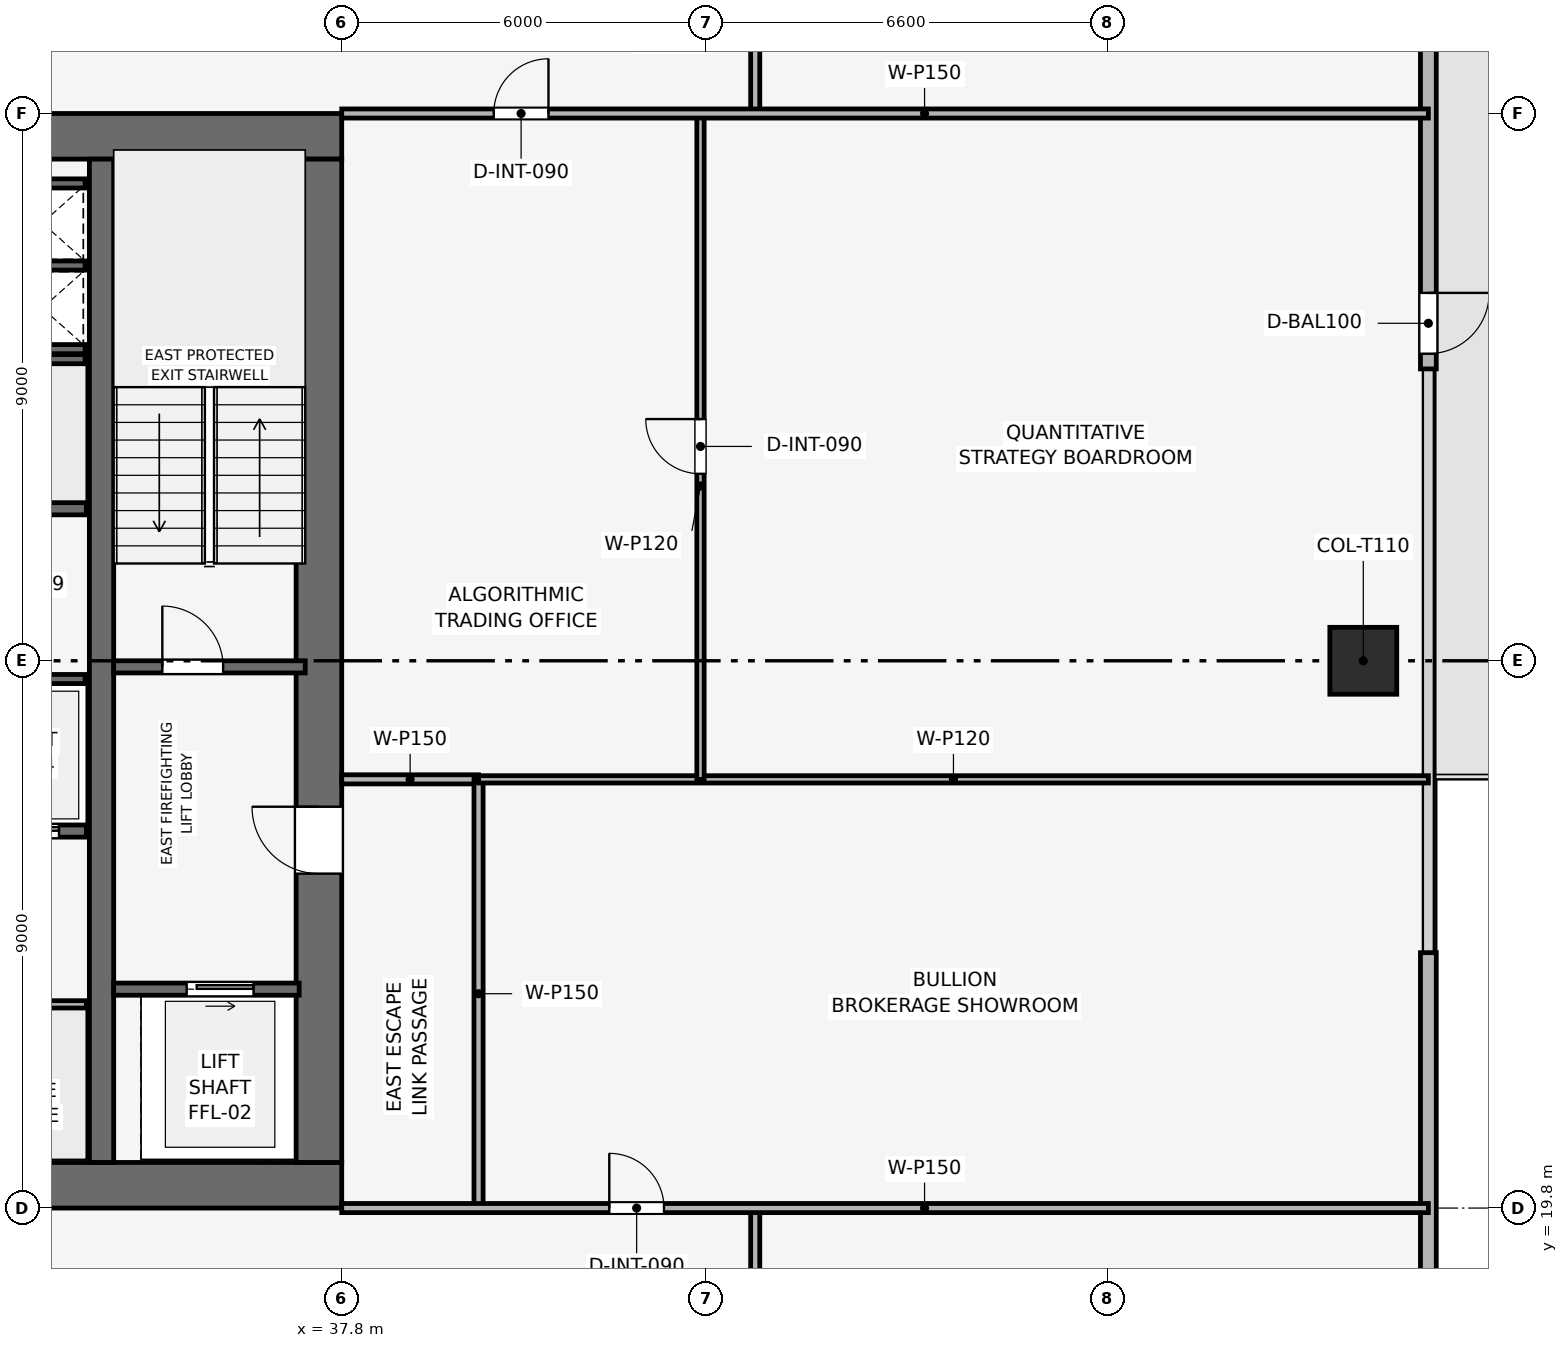
"""IFC4 building model, lengths in metres.
Left out: names, types, materials, properties, quantities, classifications, styles, units other than length and angle.
Written with IfcOpenShell. Run it as: python <this file> out.ifc"""

import sys

from ifc_helpers import new_model, si_unit, direction, frame, frame_2d, origin, origin_2d, place, context, subcontext, project, spatial, rectangle, extrude, element, fill, save


model = new_model("IFC4")
c1 = context("Model", 3, precision=1e-05, world=origin(), true_north=direction((0.0, 1.0)))
c2 = subcontext(c1, "Body", "Model", "MODEL_VIEW")
j1 = project(units=[si_unit("LENGTHUNIT", "METRE"), si_unit("PLANEANGLEUNIT", "RADIAN")], contexts=[c1])
p1 = place(None, origin())
s1 = spatial("IfcSite", under=j1, at=p1, CompositionType="ELEMENT")
p2 = place(p1, origin())
s2 = spatial("IfcBuilding", under=s1, at=p2, CompositionType="ELEMENT")
p3 = place(p2, frame((0.0, 0.0, 199.95)))
s3 = spatial("IfcBuildingStorey", under=s2, at=p3, CompositionType="ELEMENT", Elevation=199.95)
p4 = place(p3, frame((19.8, 20.175, 0.0), z_axis=(0.0, 0.0, 1.0), x_axis=(1.0, 0.0, 0.0)))
e1 = element("IfcWall", 1, at=p4, inside=s3, PredefinedType="SHEAR", context=c2, shape_type="SweptSolid", body=[
    extrude(rectangle(XDim=18.0, YDim=0.75, at=frame_2d((9.0, 0.0))), origin(), (0.0, 0.0, 1.0), 3.75),
])
p5 = place(p4, frame((8.4, 0.0, 0.0)))
e2 = element("IfcOpeningElement", 2, at=p5, cuts=e1, PredefinedType="OPENING", context=c2, shape_type="SweptSolid", body=[
    extrude(rectangle(XDim=1.2, YDim=2.2, at=frame_2d((0.6, 1.1))), frame((0.0, 0.385, 0.0), z_axis=(0.0, -1.0, 0.0), x_axis=(1.0, 0.0, 0.0)), (0.0, 0.0, 1.0), 0.77),
])
p6 = place(p3, frame((19.8, 37.425, 0.0), z_axis=(0.0, 0.0, 1.0), x_axis=(1.0, 0.0, 0.0)))
e3 = element("IfcWall", 3, at=p6, inside=s3, PredefinedType="SHEAR", context=c2, shape_type="SweptSolid", body=[
    extrude(rectangle(XDim=18.0, YDim=0.75, at=frame_2d((9.0, 0.0))), origin(), (0.0, 0.0, 1.0), 3.75),
])
p7 = place(p6, frame((7.05, 0.0, 0.0)))
e4 = element("IfcOpeningElement", 4, at=p7, cuts=e3, PredefinedType="OPENING", context=c2, shape_type="SweptSolid", body=[
    extrude(rectangle(XDim=1.1, YDim=2.15, at=frame_2d((0.55, 1.075))), frame((0.0, 0.385, 0.0), z_axis=(0.0, -1.0, 0.0), x_axis=(1.0, 0.0, 0.0)), (0.0, 0.0, 1.0), 0.77),
])
p8 = place(p3, frame((37.425, 20.55, 0.0), z_axis=(0.0, 0.0, 1.0), x_axis=(0.0, 1.0, 0.0)))
e5 = element("IfcWall", 5, at=p8, inside=s3, PredefinedType="SHEAR", context=c2, shape_type="SweptSolid", body=[
    extrude(rectangle(XDim=16.5, YDim=0.75, at=frame_2d((8.25, 0.0))), origin(), (0.0, 0.0, 1.0), 3.75),
])
p9 = place(p8, frame((4.75, 0.0, 0.0)))
e6 = element("IfcOpeningElement", 6, at=p9, cuts=e5, PredefinedType="OPENING", context=c2, shape_type="SweptSolid", body=[
    extrude(rectangle(XDim=1.1, YDim=2.15, at=frame_2d((0.55, 1.075))), frame((0.0, 0.385, 0.0), z_axis=(0.0, -1.0, 0.0), x_axis=(1.0, 0.0, 0.0)), (0.0, 0.0, 1.0), 0.77),
])
p10 = place(p3, frame((33.85, 20.55, 0.0), z_axis=(0.0, 0.0, 1.0), x_axis=(0.0, 1.0, 0.0)))
e7 = element("IfcWall", 7, at=p10, inside=s3, PredefinedType="SHEAR", context=c2, shape_type="SweptSolid", body=[
    extrude(rectangle(XDim=16.5, YDim=0.4, at=frame_2d((8.25, 0.0))), origin(), (0.0, 0.0, 1.0), 3.75),
])
p11 = place(p3, frame((54.6, 28.8, 0.003), z_axis=(0.0, 0.0, 1.0), x_axis=(1.0, 0.0, 0.0)))
e8 = element("IfcColumn", 8, at=p11, inside=s3, PredefinedType="COLUMN", context=c2, shape_type="SweptSolid", body=[
    extrude(rectangle(XDim=1.1, YDim=1.1, at=origin_2d()), origin(), (0.0, 0.0, 1.0), 3.494),
])
p12 = place(p3, frame((55.67, 48.3, 0.0), z_axis=(0.0, 0.0, 1.0), x_axis=(0.0, -1.0, 0.0)))
e9 = element("IfcWall", 9, at=p12, inside=s3, PredefinedType="SOLIDWALL", context=c2, shape_type="SweptSolid", body=[
    extrude(rectangle(XDim=14.7, YDim=0.26, at=frame_2d((7.35, 0.0))), origin(), (0.0, 0.0, 1.0), 3.5),
])
p13 = place(p12, frame((13.45, 0.0, 0.0)))
e10 = element("IfcOpeningElement", 10, at=p13, cuts=e9, PredefinedType="OPENING", context=c2, shape_type="SweptSolid", body=[
    extrude(rectangle(XDim=1.0, YDim=2.2, at=frame_2d((0.5, 1.1))), frame((0.0, 0.14, 0.0), z_axis=(0.0, -1.0, 0.0), x_axis=(1.0, 0.0, 0.0)), (0.0, 0.0, 1.0), 0.28),
])
p14 = place(p3, frame((55.67, 24.0, 0.0), z_axis=(0.0, 0.0, 1.0), x_axis=(0.0, -1.0, 0.0)))
e11 = element("IfcWall", 11, at=p14, inside=s3, PredefinedType="SOLIDWALL", context=c2, shape_type="SweptSolid", body=[
    extrude(rectangle(XDim=14.7, YDim=0.26, at=frame_2d((7.35, 0.0))), origin(), (0.0, 0.0, 1.0), 3.5),
])
p15 = place(p14, frame((10.65, 0.0, 0.9)))
e12 = element("IfcOpeningElement", 12, at=p15, cuts=e11, PredefinedType="OPENING", context=c2, shape_type="SweptSolid", body=[
    extrude(rectangle(XDim=3.8, YDim=1.9, at=frame_2d((1.9, 0.95))), frame((0.0, 0.14, 0.0), z_axis=(0.0, -1.0, 0.0), x_axis=(1.0, 0.0, 0.0)), (0.0, 0.0, 1.0), 0.28),
])
p16 = place(p3, frame((34.05, 28.7, 0.0), z_axis=(0.0, 0.0, 1.0), x_axis=(1.0, 0.0, 0.0)))
e13 = element("IfcWall", 13, at=p16, inside=s3, PredefinedType="SHEAR", context=c2, shape_type="SweptSolid", body=[
    extrude(rectangle(XDim=3.15, YDim=0.2, at=frame_2d((1.575, 0.0))), origin(), (0.0, 0.0, 1.0), 3.5),
])
p17 = place(p16, frame((0.8, 0.0, 0.0)))
e14 = element("IfcOpeningElement", 14, at=p17, cuts=e13, PredefinedType="OPENING", context=c2, shape_type="SweptSolid", body=[
    extrude(rectangle(XDim=1.0, YDim=2.1, at=frame_2d((0.5, 1.05))), frame((0.0, 0.11, 0.0), z_axis=(0.0, -1.0, 0.0), x_axis=(1.0, 0.0, 0.0)), (0.0, 0.0, 1.0), 0.22),
])
for number, where, z_axis, x_axis in (
    (15, (32.25, 33.925, 0.0), (0.0, 0.0, 1.0), (1.0, 0.0, 0.0)),
    (16, (32.25, 35.3, 0.0), (0.0, 0.0, 1.0), (1.0, 0.0, 0.0)),
):
    element("IfcWall", number, at=place(p3, frame(where, z_axis=z_axis, x_axis=x_axis)), inside=s3, PredefinedType="SHEAR", context=c2, shape_type="SweptSolid", body=[
        extrude(rectangle(XDim=1.33, YDim=0.15, at=frame_2d((0.665, 0.0))), origin(), (0.0, 0.0, 1.0), 3.5),
    ])
p18 = place(p3, frame((34.05, 23.4, 0.0), z_axis=(0.0, 0.0, 1.0), x_axis=(1.0, 0.0, 0.0)))
e17 = element("IfcWall", 17, at=p18, inside=s3, PredefinedType="SHEAR", context=c2, shape_type="SweptSolid", body=[
    extrude(rectangle(XDim=3.05, YDim=0.2, at=frame_2d((1.525, 0.0))), origin(), (0.0, 0.0, 1.0), 3.5),
])
p19 = place(p18, frame((1.2, 0.0, 0.0)))
e18 = element("IfcOpeningElement", 18, at=p19, cuts=e17, PredefinedType="OPENING", context=c2, shape_type="SweptSolid", body=[
    extrude(rectangle(XDim=1.1, YDim=2.15, at=frame_2d((0.55, 1.075))), frame((0.0, 0.11, 0.0), z_axis=(0.0, -1.0, 0.0), x_axis=(1.0, 0.0, 0.0)), (0.0, 0.0, 1.0), 0.22),
])
p20 = place(p3, frame((31.6, 26.0, 0.0), z_axis=(0.0, 0.0, 1.0), x_axis=(1.0, 0.0, 0.0)))
e19 = element("IfcWall", 19, at=p20, inside=s3, PredefinedType="SHEAR", context=c2, shape_type="SweptSolid", body=[
    extrude(rectangle(XDim=2.0, YDim=0.2, at=frame_2d((1.0, 0.0))), origin(), (0.0, 0.0, 1.0), 3.5),
])
p21 = place(p20, frame((0.45, 0.0, 0.0)))
e20 = element("IfcOpeningElement", 20, at=p21, cuts=e19, PredefinedType="OPENING", context=c2, shape_type="SweptSolid", body=[
    extrude(rectangle(XDim=1.1, YDim=2.15, at=frame_2d((0.55, 1.075))), frame((0.0, 0.11, 0.0), z_axis=(0.0, -1.0, 0.0), x_axis=(1.0, 0.0, 0.0)), (0.0, 0.0, 1.0), 0.22),
])
p22 = place(p3, frame((31.6, 31.3, 0.0), z_axis=(0.0, 0.0, 1.0), x_axis=(1.0, 0.0, 0.0)))
e21 = element("IfcWall", 21, at=p22, inside=s3, PredefinedType="SHEAR", context=c2, shape_type="SweptSolid", body=[
    extrude(rectangle(XDim=2.0, YDim=0.2, at=frame_2d((1.0, 0.0))), origin(), (0.0, 0.0, 1.0), 3.5),
])
p23 = place(p3, frame((32.25, 36.65, 0.0), z_axis=(0.0, 0.0, 1.0), x_axis=(1.0, 0.0, 0.0)))
e22 = element("IfcWall", 22, at=p23, inside=s3, PredefinedType="SHEAR", context=c2, shape_type="SweptSolid", body=[
    extrude(rectangle(XDim=1.33, YDim=0.15, at=frame_2d((0.665, 0.0))), origin(), (0.0, 0.0, 1.0), 3.5),
])
for number, where, z_axis, x_axis in (
    (23, (29.5, 28.5, 0.0), (0.0, 0.0, 1.0), (1.0, 0.0, 0.0)),
    (24, (29.5, 33.76, 0.0), (0.0, 0.0, 1.0), (1.0, 0.0, 0.0)),
):
    element("IfcWall", number, at=place(p3, frame(where, z_axis=z_axis, x_axis=x_axis)), inside=s3, PredefinedType="SHEAR", context=c2, shape_type="SweptSolid", body=[
        extrude(rectangle(XDim=4.08, YDim=0.15, at=frame_2d((2.04, 0.0))), origin(), (0.0, 0.0, 1.0), 3.5),
    ])
p24 = place(p3, frame((29.55, 23.15, 0.0), z_axis=(0.0, 0.0, 1.0), x_axis=(1.0, 0.0, 0.0)))
e25 = element("IfcWall", 25, at=p24, inside=s3, PredefinedType="PARTITIONING", context=c2, shape_type="SweptSolid", body=[
    extrude(rectangle(XDim=4.05, YDim=0.12, at=frame_2d((2.025, 0.0))), origin(), (0.0, 0.0, 1.0), 3.5),
])
p25 = place(p24, frame((1.575, 0.0, 0.0)))
e26 = element("IfcOpeningElement", 26, at=p25, cuts=e25, PredefinedType="OPENING", context=c2, shape_type="SweptSolid", body=[
    extrude(rectangle(XDim=0.9, YDim=2.1, at=frame_2d((0.45, 1.05))), frame((0.0, 0.07, 0.0), z_axis=(0.0, -1.0, 0.0), x_axis=(1.0, 0.0, 0.0)), (0.0, 0.0, 1.0), 0.14),
])
p26 = place(p3, frame((37.8, 26.85, 0.0), z_axis=(0.0, 0.0, 1.0), x_axis=(1.0, 0.0, 0.0)))
e27 = element("IfcWall", 27, at=p26, inside=s3, PredefinedType="PARTITIONING", context=c2, shape_type="SweptSolid", body=[
    extrude(rectangle(XDim=2.25, YDim=0.15, at=frame_2d((1.125, 0.0))), origin(), (0.0, 0.0, 1.0), 3.5),
])
p27 = place(p3, frame((40.05, 19.8, 0.0), z_axis=(0.0, 0.0, 1.0), x_axis=(0.0, 1.0, 0.0)))
e28 = element("IfcWall", 28, at=p27, inside=s3, PredefinedType="PARTITIONING", context=c2, shape_type="SweptSolid", body=[
    extrude(rectangle(XDim=7.05, YDim=0.15, at=frame_2d((3.525, 0.0))), origin(), (0.0, 0.0, 1.0), 3.035),
])
p28 = place(p3, frame((40.05, 26.85, 0.0), z_axis=(0.0, 0.0, 1.0), x_axis=(1.0, 0.0, 0.0)))
e29 = element("IfcWall", 29, at=p28, inside=s3, PredefinedType="PARTITIONING", context=c2, shape_type="SweptSolid", body=[
    extrude(rectangle(XDim=15.62, YDim=0.12, at=frame_2d((7.81, 0.0))), origin(), (0.0, 0.0, 1.0), 2.885),
])
p29 = place(p3, frame((43.7, 26.85, 0.0), z_axis=(0.0, 0.0, 1.0), x_axis=(0.0, 1.0, 0.0)))
e30 = element("IfcWall", 30, at=p29, inside=s3, PredefinedType="PARTITIONING", context=c2, shape_type="SweptSolid", body=[
    extrude(rectangle(XDim=10.95, YDim=0.12, at=frame_2d((5.475, 0.0))), origin(), (0.0, 0.0, 1.0), 3.035),
])
p30 = place(p29, frame((5.025, 0.0, 0.0)))
e31 = element("IfcOpeningElement", 31, at=p30, cuts=e30, PredefinedType="OPENING", context=c2, shape_type="SweptSolid", body=[
    extrude(rectangle(XDim=0.9, YDim=2.1, at=frame_2d((0.45, 1.05))), frame((0.0, 0.07, 0.0), z_axis=(0.0, -1.0, 0.0), x_axis=(1.0, 0.0, 0.0)), (0.0, 0.0, 1.0), 0.14),
])
p31 = place(p3, frame((44.6, 17.4, 0.0), z_axis=(0.0, 0.0, 1.0), x_axis=(0.0, 1.0, 0.0)))
e32 = element("IfcWall", 32, at=p31, inside=s3, PredefinedType="PARTITIONING", context=c2, shape_type="SweptSolid", body=[
    extrude(rectangle(XDim=2.4, YDim=0.15, at=frame_2d((1.2, 0.0))), origin(), (0.0, 0.0, 1.0), 3.5),
])
p32 = place(p3, frame((44.6, 37.8, 0.0), z_axis=(0.0, 0.0, 1.0), x_axis=(0.0, 1.0, 0.0)))
e33 = element("IfcWall", 33, at=p32, inside=s3, PredefinedType="PARTITIONING", context=c2, shape_type="SweptSolid", body=[
    extrude(rectangle(XDim=2.4, YDim=0.15, at=frame_2d((1.2, 0.0))), origin(), (0.0, 0.0, 1.0), 3.5),
])
p33 = place(p3, frame((37.8, 19.8, 0.0), z_axis=(0.0, 0.0, 1.0), x_axis=(1.0, 0.0, 0.0)))
e34 = element("IfcWall", 34, at=p33, inside=s3, PredefinedType="PARTITIONING", context=c2, shape_type="SweptSolid", body=[
    extrude(rectangle(XDim=17.87, YDim=0.15, at=frame_2d((8.935, 0.0))), origin(), (0.0, 0.0, 1.0), 2.885),
])
p34 = place(p33, frame((4.4, 0.0, 0.0)))
e35 = element("IfcOpeningElement", 35, at=p34, cuts=e34, PredefinedType="OPENING", context=c2, shape_type="SweptSolid", body=[
    extrude(rectangle(XDim=0.9, YDim=2.1, at=frame_2d((0.45, 1.05))), frame((0.0, 0.085, 0.0), z_axis=(0.0, -1.0, 0.0), x_axis=(1.0, 0.0, 0.0)), (0.0, 0.0, 1.0), 0.17),
])
p35 = place(p3, frame((37.8, 37.8, 0.0), z_axis=(0.0, 0.0, 1.0), x_axis=(1.0, 0.0, 0.0)))
e36 = element("IfcWall", 36, at=p35, inside=s3, PredefinedType="PARTITIONING", context=c2, shape_type="SweptSolid", body=[
    extrude(rectangle(XDim=17.87, YDim=0.15, at=frame_2d((8.935, 0.0))), origin(), (0.0, 0.0, 1.0), 2.885),
])
p36 = place(p35, frame((2.5, 0.0, 0.0)))
e37 = element("IfcOpeningElement", 37, at=p36, cuts=e36, PredefinedType="OPENING", context=c2, shape_type="SweptSolid", body=[
    extrude(rectangle(XDim=0.9, YDim=2.1, at=frame_2d((0.45, 1.05))), frame((0.0, 0.085, 0.0), z_axis=(0.0, -1.0, 0.0), x_axis=(1.0, 0.0, 0.0)), (0.0, 0.0, 1.0), 0.17),
])
p37 = place(p13, origin())
e38 = element("IfcDoor", 38, at=p37, inside=s3, OperationType="SINGLE_SWING_LEFT", PredefinedType="DOOR", context=c2, shape_type="SweptSolid", body=[
    extrude(rectangle(XDim=1.0, YDim=2.2, at=frame_2d((0.5, 1.1))), frame((0.0, 0.025, 0.0), z_axis=(0.0, -1.0, 0.0), x_axis=(1.0, 0.0, 0.0)), (0.0, 0.0, 1.0), 0.05),
])
fill(e10, e38)
p38 = place(p17, origin())
e39 = element("IfcDoor", 39, at=p38, inside=s3, OperationType="SINGLE_SWING_LEFT", PredefinedType="DOOR", context=c2, shape_type="SweptSolid", body=[
    extrude(rectangle(XDim=1.0, YDim=2.1, at=frame_2d((0.5, 1.05))), frame((0.0, 0.025, 0.0), z_axis=(0.0, -1.0, 0.0), x_axis=(1.0, 0.0, 0.0)), (0.0, 0.0, 1.0), 0.05),
])
fill(e14, e39)
p39 = place(p19, origin())
e40 = element("IfcDoor", 40, at=p39, inside=s3, OperationType="SLIDING_TO_RIGHT", PredefinedType="DOOR", context=c2, shape_type="SweptSolid", body=[
    extrude(rectangle(XDim=1.1, YDim=2.15, at=frame_2d((0.55, 1.075))), frame((0.0, 0.025, 0.0), z_axis=(0.0, -1.0, 0.0), x_axis=(1.0, 0.0, 0.0)), (0.0, 0.0, 1.0), 0.05),
])
fill(e18, e40)
p40 = place(p21, origin())
e41 = element("IfcDoor", 41, at=p40, inside=s3, OperationType="SLIDING_TO_RIGHT", PredefinedType="DOOR", context=c2, shape_type="SweptSolid", body=[
    extrude(rectangle(XDim=1.1, YDim=2.15, at=frame_2d((0.55, 1.075))), frame((0.0, 0.025, 0.0), z_axis=(0.0, -1.0, 0.0), x_axis=(1.0, 0.0, 0.0)), (0.0, 0.0, 1.0), 0.05),
])
fill(e20, e41)
p41 = place(p30, origin())
e42 = element("IfcDoor", 42, at=p41, inside=s3, OperationType="SINGLE_SWING_RIGHT", PredefinedType="DOOR", context=c2, shape_type="SweptSolid", body=[
    extrude(rectangle(XDim=0.9, YDim=2.1, at=frame_2d((0.45, 1.05))), frame((0.0, 0.025, 0.0), z_axis=(0.0, -1.0, 0.0), x_axis=(1.0, 0.0, 0.0)), (0.0, 0.0, 1.0), 0.05),
])
fill(e31, e42)
p42 = place(p34, origin())
e43 = element("IfcDoor", 43, at=p42, inside=s3, OperationType="SINGLE_SWING_LEFT", PredefinedType="DOOR", context=c2, shape_type="SweptSolid", body=[
    extrude(rectangle(XDim=0.9, YDim=2.1, at=frame_2d((0.45, 1.05))), frame((0.0, 0.025, 0.0), z_axis=(0.0, -1.0, 0.0), x_axis=(1.0, 0.0, 0.0)), (0.0, 0.0, 1.0), 0.05),
])
fill(e35, e43)
p43 = place(p36, origin())
e44 = element("IfcDoor", 44, at=p43, inside=s3, OperationType="SINGLE_SWING_RIGHT", PredefinedType="DOOR", context=c2, shape_type="SweptSolid", body=[
    extrude(rectangle(XDim=0.9, YDim=2.1, at=frame_2d((0.45, 1.05))), frame((0.0, 0.025, 0.0), z_axis=(0.0, -1.0, 0.0), x_axis=(1.0, 0.0, 0.0)), (0.0, 0.0, 1.0), 0.05),
])
fill(e37, e44)
p44 = place(p9, origin())
e45 = element("IfcDoor", 45, at=p44, inside=s3, OperationType="SINGLE_SWING_RIGHT", PredefinedType="DOOR", context=c2, shape_type="SweptSolid", body=[
    extrude(rectangle(XDim=1.1, YDim=2.15, at=frame_2d((0.55, 1.075))), frame((0.0, 0.025, 0.0), z_axis=(0.0, -1.0, 0.0), x_axis=(1.0, 0.0, 0.0)), (0.0, 0.0, 1.0), 0.05),
])
fill(e6, e45)
save(model, sys.argv[1])
